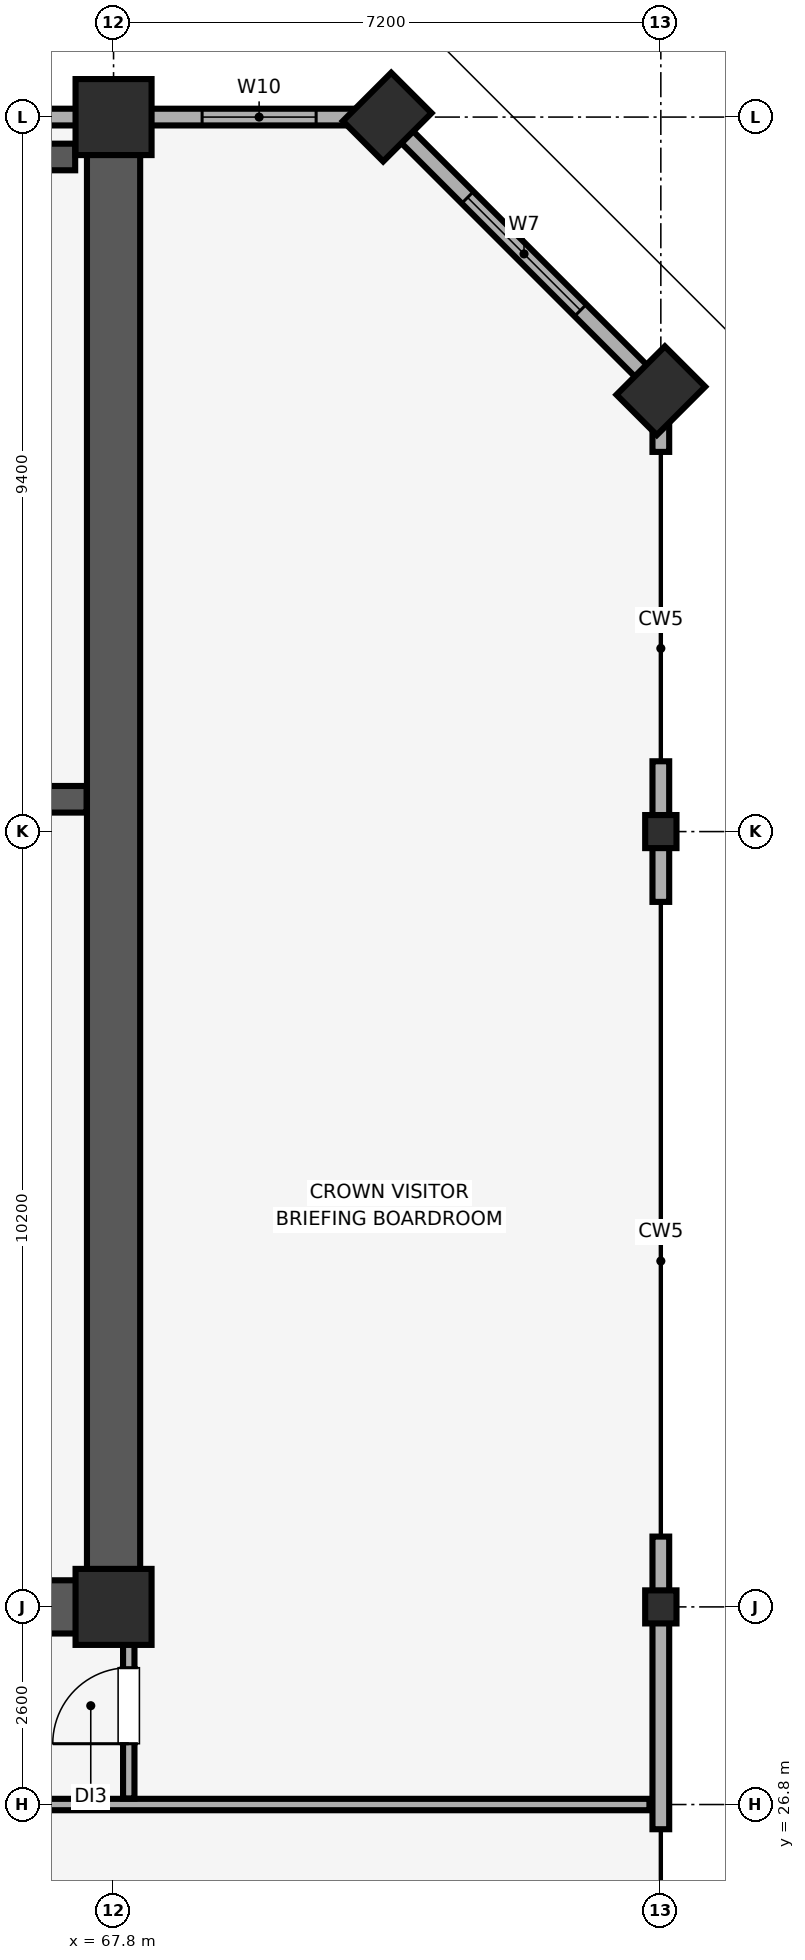
"""IFC4 building model, lengths in metres.
Left out: names, types, materials, properties, quantities, classifications, styles, units other than length and angle.
Written with IfcOpenShell. Run it as: python <this file> out.ifc"""

import sys

from ifc_helpers import new_model, si_unit, direction, frame, frame_2d, origin, origin_2d, place, context, subcontext, project, spatial, rectangle, i_section, extrude, element, fill, save


model = new_model("IFC4")
c1 = context("Model", 3, precision=1e-05, world=origin(), true_north=direction((0.0, 1.0)))
c2 = subcontext(c1, "Body", "Model", "MODEL_VIEW")
j1 = project(units=[si_unit("LENGTHUNIT", "METRE"), si_unit("PLANEANGLEUNIT", "RADIAN")], contexts=[c1])
p1 = place(None, origin())
s1 = spatial("IfcSite", under=j1, at=p1, CompositionType="ELEMENT")
p2 = place(p1, origin())
s2 = spatial("IfcBuilding", under=s1, at=p2, CompositionType="ELEMENT")
p3 = place(p2, frame((0.0, 0.0, 294.7)))
s3 = spatial("IfcBuildingStorey", under=s2, at=p3, CompositionType="ELEMENT", Elevation=294.7)
for number, where, z_axis, x_axis in (
    (1, (75.0, 29.4, 0.0), (0.0, 0.0, 1.0), (1.0, 0.0, 0.0)),
    (2, (75.0, 39.6, 0.0), (0.0, 0.0, 1.0), (1.0, 0.0, 0.0)),
):
    element("IfcColumn", number, at=place(p3, frame(where, z_axis=z_axis, x_axis=x_axis)), inside=s3, PredefinedType="COLUMN", context=c2, shape_type="SweptSolid", body=[
        extrude(i_section(OverallWidth=0.412, OverallDepth=0.435, WebThickness=0.036, FlangeThickness=0.056, FilletRadius=0.015, at=origin_2d()), origin(), (0.0, 0.0, 1.0), 5.12),
    ])
for number, where, z_axis, x_axis in (
    (3, (75.0, 45.4, 0.0), (0.0, 0.0, 1.0), (0.707, 0.707, 0.0)),
    (4, (71.4, 49.0, 0.0), (0.0, 0.0, 1.0), (0.707, 0.707, 0.0)),
):
    element("IfcColumn", number, at=place(p3, frame(where, z_axis=z_axis, x_axis=x_axis)), inside=s3, PredefinedType="PILASTER", context=c2, shape_type="SweptSolid", body=[
        extrude(rectangle(XDim=0.9, YDim=0.75, at=origin_2d()), origin(), (0.0, 0.0, 1.0), 5.12),
    ])
for number, where, z_axis, x_axis in (
    (5, (67.8, 29.4, 0.0), (0.0, 0.0, 1.0), (1.0, 0.0, 0.0)),
    (6, (67.8, 49.0, 0.0), (0.0, 0.0, 1.0), (1.0, 0.0, 0.0)),
):
    element("IfcColumn", number, at=place(p3, frame(where, z_axis=z_axis, x_axis=x_axis)), inside=s3, PredefinedType="COLUMN", context=c2, shape_type="SweptSolid", body=[
        extrude(rectangle(XDim=1.0, YDim=1.0, at=origin_2d()), origin(), (0.0, 0.0, 1.0), 5.12),
    ])
p4 = place(p3, frame((75.0, 26.475, 0.0), z_axis=(0.0, 0.0, 1.0), x_axis=(0.0, 1.0, 0.0)))
e7 = element("IfcWall", 7, at=p4, inside=s3, PredefinedType="SOLIDWALL", context=c2, shape_type="SweptSolid", body=[
    extrude(rectangle(XDim=3.85, YDim=0.22, at=frame_2d((1.925, 0.0))), origin(), (0.0, 0.0, 1.0), 4.32),
])
p5 = place(p3, frame((75.0, 38.675, 0.0), z_axis=(0.0, 0.0, 1.0), x_axis=(0.0, 1.0, 0.0)))
e8 = element("IfcWall", 8, at=p5, inside=s3, PredefinedType="SOLIDWALL", context=c2, shape_type="SweptSolid", body=[
    extrude(rectangle(XDim=1.85, YDim=0.22, at=frame_2d((0.925, 0.0))), origin(), (0.0, 0.0, 1.0), 4.32),
])
p6 = place(p3, frame((75.0, 44.595, 0.0), z_axis=(0.0, 0.0, 1.0), x_axis=(0.0, 1.0, 0.0)))
e9 = element("IfcWall", 9, at=p6, inside=s3, PredefinedType="SOLIDWALL", context=c2, shape_type="SweptSolid", body=[
    extrude(rectangle(XDim=0.805, YDim=0.22, at=frame_2d((0.402, 0.0))), origin(), (0.0, 0.0, 1.0), 5.12),
])
p7 = place(p3, frame((75.0, 45.4, 0.0), z_axis=(0.0, 0.0, 1.0), x_axis=(-0.707106781187, 0.707106781187, 0.0)))
e10 = element("IfcWall", 10, at=p7, inside=s3, PredefinedType="SOLIDWALL", context=c2, shape_type="SweptSolid", body=[
    extrude(rectangle(XDim=5.091, YDim=0.22, at=frame_2d((2.546, 0.0))), origin(), (0.0, 0.0, 1.0), 4.32),
])
p8 = place(p7, frame((1.496, 0.0, 0.85)))
e11 = element("IfcOpeningElement", 11, at=p8, cuts=e10, PredefinedType="OPENING", context=c2, shape_type="SweptSolid", body=[
    extrude(rectangle(XDim=2.1, YDim=1.6, at=frame_2d((1.05, 0.8))), frame((0.0, 0.12, 0.0), z_axis=(0.0, -1.0, 0.0), x_axis=(1.0, 0.0, 0.0)), (0.0, 0.0, 1.0), 0.24),
])
p9 = place(p3, frame((71.4, 49.0, 0.0), z_axis=(0.0, 0.0, 1.0), x_axis=(-1.0, 0.0, 0.0)))
e12 = element("IfcWall", 12, at=p9, inside=s3, PredefinedType="SOLIDWALL", context=c2, shape_type="SweptSolid", body=[
    extrude(rectangle(XDim=58.8, YDim=0.22, at=frame_2d((29.4, 0.0))), origin(), (0.0, 0.0, 1.0), 4.32),
])
p10 = place(p9, frame((56.365, 0.0, 0.85)))
e13 = element("IfcOpeningElement", 13, at=p10, cuts=e12, PredefinedType="OPENING", context=c2, shape_type="SweptSolid", body=[
    extrude(rectangle(XDim=1.5, YDim=1.4, at=frame_2d((0.75, 0.7))), frame((0.0, 0.12, 0.0), z_axis=(0.0, -1.0, 0.0), x_axis=(1.0, 0.0, 0.0)), (0.0, 0.0, 1.0), 0.24),
])
p11 = place(p9, frame((0.935, 0.0, 0.85)))
e14 = element("IfcOpeningElement", 14, at=p11, cuts=e12, PredefinedType="OPENING", context=c2, shape_type="SweptSolid", body=[
    extrude(rectangle(XDim=1.5, YDim=1.4, at=frame_2d((0.75, 0.7))), frame((0.0, 0.12, 0.0), z_axis=(0.0, -1.0, 0.0), x_axis=(1.0, 0.0, 0.0)), (0.0, 0.0, 1.0), 0.24),
])
p12 = place(p9, frame((43.865, 0.0, 0.9)))
e15 = element("IfcOpeningElement", 15, at=p12, cuts=e12, PredefinedType="OPENING", context=c2, shape_type="SweptSolid", body=[
    extrude(rectangle(XDim=1.5, YDim=1.4, at=frame_2d((0.75, 0.7))), frame((0.0, 0.12, 0.0), z_axis=(0.0, -1.0, 0.0), x_axis=(1.0, 0.0, 0.0)), (0.0, 0.0, 1.0), 0.24),
])
p13 = place(p9, frame((36.05, 0.0, 0.9)))
e16 = element("IfcOpeningElement", 16, at=p13, cuts=e12, PredefinedType="OPENING", context=c2, shape_type="SweptSolid", body=[
    extrude(rectangle(XDim=3.6, YDim=1.5, at=frame_2d((1.8, 0.75))), frame((0.0, 0.12, 0.0), z_axis=(0.0, -1.0, 0.0), x_axis=(1.0, 0.0, 0.0)), (0.0, 0.0, 1.0), 0.24),
])
p14 = place(p9, frame((22.65, 0.0, 0.9)))
e17 = element("IfcOpeningElement", 17, at=p14, cuts=e12, PredefinedType="OPENING", context=c2, shape_type="SweptSolid", body=[
    extrude(rectangle(XDim=1.5, YDim=1.4, at=frame_2d((0.75, 0.7))), frame((0.0, 0.12, 0.0), z_axis=(0.0, -1.0, 0.0), x_axis=(1.0, 0.0, 0.0)), (0.0, 0.0, 1.0), 0.24),
])
p15 = place(p9, frame((19.0, 0.0, 0.9)))
e18 = element("IfcOpeningElement", 18, at=p15, cuts=e12, PredefinedType="OPENING", context=c2, shape_type="SweptSolid", body=[
    extrude(rectangle(XDim=2.4, YDim=1.5, at=frame_2d((1.2, 0.75))), frame((0.0, 0.12, 0.0), z_axis=(0.0, -1.0, 0.0), x_axis=(1.0, 0.0, 0.0)), (0.0, 0.0, 1.0), 0.24),
])
p16 = place(p9, frame((14.635, 0.0, 0.9)))
e19 = element("IfcOpeningElement", 19, at=p16, cuts=e12, PredefinedType="OPENING", context=c2, shape_type="SweptSolid", body=[
    extrude(rectangle(XDim=2.4, YDim=1.5, at=frame_2d((1.2, 0.75))), frame((0.0, 0.12, 0.0), z_axis=(0.0, -1.0, 0.0), x_axis=(1.0, 0.0, 0.0)), (0.0, 0.0, 1.0), 0.24),
])
p17 = place(p3, frame((67.8, 29.4, 0.0), z_axis=(0.0, 0.0, 1.0), x_axis=(0.0, 1.0, 0.0)))
e20 = element("IfcWall", 20, at=p17, inside=s3, PredefinedType="SHEAR", context=c2, shape_type="SweptSolid", body=[
    extrude(rectangle(XDim=19.2, YDim=0.7, at=frame_2d((9.6, 0.0))), origin(), (0.0, 0.0, 1.0), 5.12),
])
p18 = place(p3, frame((60.4, 29.4, 0.0), z_axis=(0.0, 0.0, 1.0), x_axis=(1.0, 0.0, 0.0)))
e21 = element("IfcWall", 21, at=p18, inside=s3, PredefinedType="SHEAR", context=c2, shape_type="SweptSolid", body=[
    extrude(rectangle(XDim=7.045, YDim=0.7, at=frame_2d((3.522, 0.0))), origin(), (0.0, 0.0, 1.0), 5.12),
])
p19 = place(p3, frame((63.145, 40.025, 0.0), z_axis=(0.0, 0.0, 1.0), x_axis=(1.0, 0.0, 0.0)))
e22 = element("IfcWall", 22, at=p19, inside=s3, PredefinedType="SHEAR", context=c2, shape_type="SweptSolid", body=[
    extrude(rectangle(XDim=4.3, YDim=0.35, at=frame_2d((2.15, 0.0))), origin(), (0.0, 0.0, 1.0), 5.12),
])
p20 = place(p19, frame((1.24, 0.0, 0.0)))
e23 = element("IfcOpeningElement", 23, at=p20, cuts=e22, PredefinedType="OPENING", context=c2, shape_type="SweptSolid", body=[
    extrude(rectangle(XDim=1.15, YDim=2.15, at=frame_2d((0.575, 1.075))), frame((0.0, 0.185, 0.0), z_axis=(0.0, -1.0, 0.0), x_axis=(1.0, 0.0, 0.0)), (0.0, 0.0, 1.0), 0.37),
])
p21 = place(p3, frame((63.145, 48.475, 0.0), z_axis=(0.0, 0.0, 1.0), x_axis=(1.0, 0.0, 0.0)))
e24 = element("IfcWall", 24, at=p21, inside=s3, PredefinedType="SHEAR", context=c2, shape_type="SweptSolid", body=[
    extrude(rectangle(XDim=4.15, YDim=0.35, at=frame_2d((2.075, 0.0))), origin(), (0.0, 0.0, 1.0), 5.12),
])
p22 = place(p3, frame((45.68, 26.8, 0.0), z_axis=(0.0, 0.0, 1.0), x_axis=(1.0, 0.0, 0.0)))
e25 = element("IfcWall", 25, at=p22, inside=s3, PredefinedType="PARTITIONING", context=c2, shape_type="SweptSolid", body=[
    extrude(rectangle(XDim=29.17, YDim=0.15, at=frame_2d((14.585, 0.0))), origin(), (0.0, 0.0, 1.0), 5.12),
])
p23 = place(p22, frame((10.57, 0.0, 0.0)))
e26 = element("IfcOpeningElement", 26, at=p23, cuts=e25, PredefinedType="OPENING", context=c2, shape_type="SweptSolid", body=[
    extrude(rectangle(XDim=1.5, YDim=2.25, at=frame_2d((0.75, 1.125))), frame((0.0, 0.085, 0.0), z_axis=(0.0, -1.0, 0.0), x_axis=(1.0, 0.0, 0.0)), (0.0, 0.0, 1.0), 0.17),
])
p24 = place(p3, frame((68.0, 26.88, 0.0), z_axis=(0.0, 0.0, 1.0), x_axis=(0.0, 1.0, 0.0)))
e27 = element("IfcWall", 27, at=p24, inside=s3, PredefinedType="PARTITIONING", context=c2, shape_type="SweptSolid", body=[
    extrude(rectangle(XDim=2.51, YDim=0.15, at=frame_2d((1.255, 0.0))), origin(), (0.0, 0.0, 1.0), 4.76),
])
p25 = place(p24, frame((0.72, 0.0, 0.0)))
e28 = element("IfcOpeningElement", 28, at=p25, cuts=e27, PredefinedType="OPENING", context=c2, shape_type="SweptSolid", body=[
    extrude(rectangle(XDim=1.0, YDim=2.15, at=frame_2d((0.5, 1.075))), frame((0.0, 0.085, 0.0), z_axis=(0.0, -1.0, 0.0), x_axis=(1.0, 0.0, 0.0)), (0.0, 0.0, 1.0), 0.17),
])
p26 = place(p8, origin())
e29 = element("IfcWindow", 29, at=p26, inside=s3, PartitioningType="SINGLE_PANEL", PredefinedType="WINDOW", context=c2, shape_type="SweptSolid", body=[
    extrude(rectangle(XDim=2.1, YDim=1.6, at=frame_2d((1.05, 0.8))), frame((0.0, 0.03, 0.0), z_axis=(0.0, -1.0, 0.0), x_axis=(1.0, 0.0, 0.0)), (0.0, 0.0, 1.0), 0.06),
])
fill(e11, e29)
p27 = place(p11, origin())
e30 = element("IfcWindow", 30, at=p27, inside=s3, PartitioningType="SINGLE_PANEL", PredefinedType="WINDOW", context=c2, shape_type="SweptSolid", body=[
    extrude(rectangle(XDim=1.5, YDim=1.4, at=frame_2d((0.75, 0.7))), frame((0.0, 0.03, 0.0), z_axis=(0.0, -1.0, 0.0), x_axis=(1.0, 0.0, 0.0)), (0.0, 0.0, 1.0), 0.06),
])
fill(e14, e30)
p28 = place(p25, origin())
e31 = element("IfcDoor", 31, at=p28, inside=s3, OperationType="SINGLE_SWING_LEFT", PredefinedType="DOOR", context=c2, shape_type="SweptSolid", body=[
    extrude(rectangle(XDim=1.0, YDim=2.15, at=frame_2d((0.5, 1.075))), frame((0.0, 0.025, 0.0), z_axis=(0.0, -1.0, 0.0), x_axis=(1.0, 0.0, 0.0)), (0.0, 0.0, 1.0), 0.05),
])
fill(e28, e31)
save(model, sys.argv[1])
